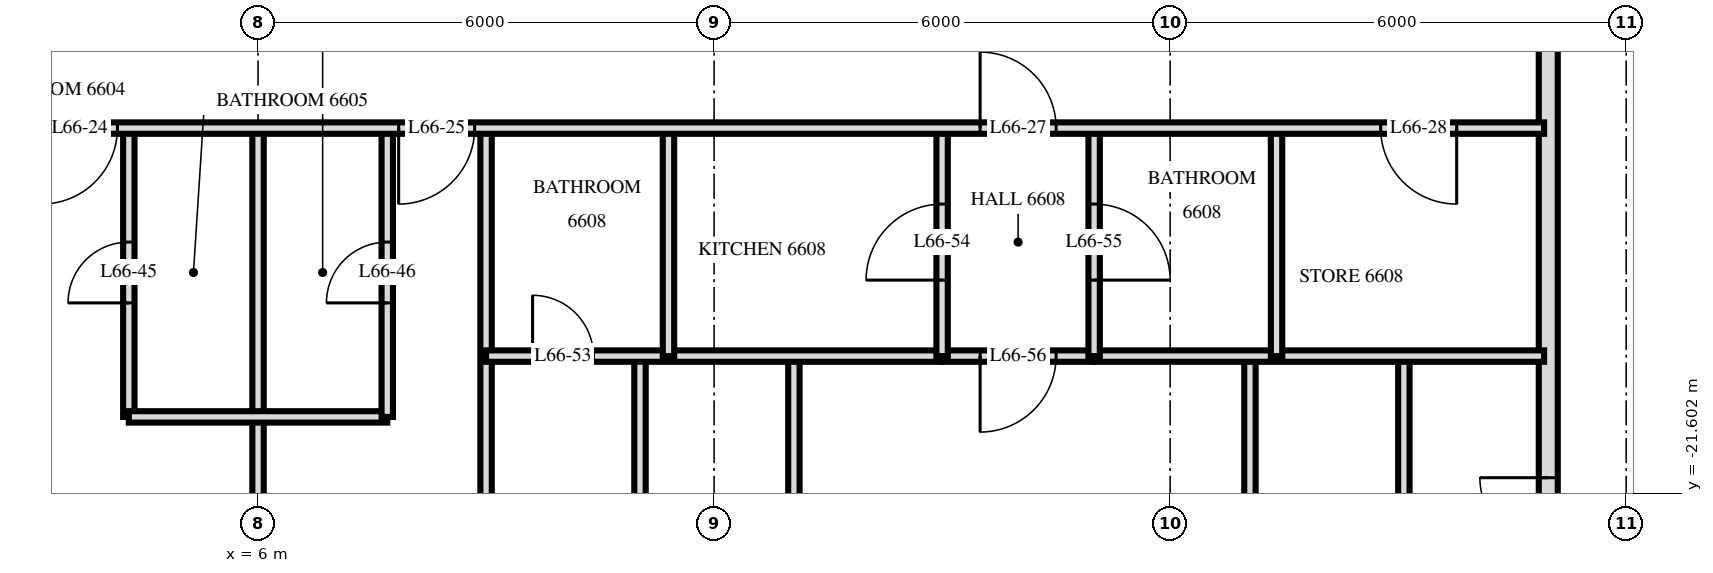
"""IFC4 building model, lengths in metres.
Left out: names, types, materials, properties, quantities, classifications, styles, units other than length and angle.
Written with IfcOpenShell. Run it as: python <this file> out.ifc"""

import sys

from ifc_helpers import new_model, si_unit, direction, frame, frame_2d, origin, place, context, subcontext, project, spatial, rectangle, extrude, element, fill, save


model = new_model("IFC4")
c1 = context("Model", 3, precision=1e-05, world=origin(), true_north=direction((0.0, 1.0)))
c2 = subcontext(c1, "Body", "Model", "MODEL_VIEW")
j1 = project(units=[si_unit("LENGTHUNIT", "METRE"), si_unit("PLANEANGLEUNIT", "RADIAN")], contexts=[c1])
p1 = place(None, origin())
s1 = spatial("IfcSite", under=j1, at=p1, CompositionType="ELEMENT")
p2 = place(p1, origin())
s2 = spatial("IfcBuilding", under=s1, at=p2, CompositionType="ELEMENT")
p3 = place(p2, frame((0.0, 0.0, 252.6)))
s3 = spatial("IfcBuildingStorey", under=s2, at=p3, CompositionType="ELEMENT", Elevation=252.6)
p4 = place(p3, frame((22.975, -29.275, 0.0), z_axis=(0.0, 0.0, 1.0), x_axis=(0.0, 1.0, 0.0)))
e1 = element("IfcWall", 1, at=p4, inside=s3, PredefinedType="SOLIDWALL", context=c2, shape_type="SweptSolid", body=[
    extrude(rectangle(XDim=25.951, YDim=0.25, at=frame_2d((12.975, 0.0))), origin(), (0.0, 0.0, 1.0), 3.22),
])
p5 = place(p4, frame((0.575, 0.0, 0.0)))
e2 = element("IfcOpeningElement", 2, at=p5, cuts=e1, PredefinedType="OPENING", context=c2, shape_type="SweptSolid", body=[
    extrude(rectangle(XDim=1.8, YDim=2.4, at=frame_2d((0.9, 1.2))), frame((0.0, 0.135, 0.0), z_axis=(0.0, -1.0, 0.0), x_axis=(1.0, 0.0, 0.0)), (0.0, 0.0, 1.0), 0.27),
])
p6 = place(p4, frame((3.325, 0.0, 0.9)))
e3 = element("IfcOpeningElement", 3, at=p6, cuts=e1, PredefinedType="OPENING", context=c2, shape_type="SweptSolid", body=[
    extrude(rectangle(XDim=1.8, YDim=1.5, at=frame_2d((0.9, 0.75))), frame((0.0, 0.135, 0.0), z_axis=(0.0, -1.0, 0.0), x_axis=(1.0, 0.0, 0.0)), (0.0, 0.0, 1.0), 0.27),
])
p7 = place(p4, frame((6.075, 0.0, 0.0)))
e4 = element("IfcOpeningElement", 4, at=p7, cuts=e1, PredefinedType="OPENING", context=c2, shape_type="SweptSolid", body=[
    extrude(rectangle(XDim=1.8, YDim=2.4, at=frame_2d((0.9, 1.2))), frame((0.0, 0.135, 0.0), z_axis=(0.0, -1.0, 0.0), x_axis=(1.0, 0.0, 0.0)), (0.0, 0.0, 1.0), 0.27),
])
p8 = place(p4, frame((14.875, 0.0, 0.0)))
e5 = element("IfcOpeningElement", 5, at=p8, cuts=e1, PredefinedType="OPENING", context=c2, shape_type="SweptSolid", body=[
    extrude(rectangle(XDim=1.8, YDim=2.4, at=frame_2d((0.9, 1.2))), frame((0.0, 0.135, 0.0), z_axis=(0.0, -1.0, 0.0), x_axis=(1.0, 0.0, 0.0)), (0.0, 0.0, 1.0), 0.27),
])
p9 = place(p4, frame((17.575, 0.0, 0.9)))
e6 = element("IfcOpeningElement", 6, at=p9, cuts=e1, PredefinedType="OPENING", context=c2, shape_type="SweptSolid", body=[
    extrude(rectangle(XDim=2.4, YDim=1.5, at=frame_2d((1.2, 0.75))), frame((0.0, 0.135, 0.0), z_axis=(0.0, -1.0, 0.0), x_axis=(1.0, 0.0, 0.0)), (0.0, 0.0, 1.0), 0.27),
])
p10 = place(p4, frame((22.925, 0.0, 0.0)))
e7 = element("IfcOpeningElement", 7, at=p10, cuts=e1, PredefinedType="OPENING", context=c2, shape_type="SweptSolid", body=[
    extrude(rectangle(XDim=1.8, YDim=2.4, at=frame_2d((0.9, 1.2))), frame((0.0, 0.135, 0.0), z_axis=(0.0, -1.0, 0.0), x_axis=(1.0, 0.0, 0.0)), (0.0, 0.0, 1.0), 0.27),
])
p11 = place(p3, frame((21.075, -32.666, 0.0), z_axis=(0.0, 0.0, 1.0), x_axis=(0.0, 1.0, 0.0)))
e8 = element("IfcWall", 8, at=p11, inside=s3, PredefinedType="PARTITIONING", context=c2, shape_type="SweptSolid", body=[
    extrude(rectangle(XDim=12.866, YDim=0.15, at=frame_2d((6.433, 0.0))), origin(), (0.0, 0.0, 1.0), 3.22),
])
p12 = place(p11, frame((5.846, 0.0, 0.0)))
e9 = element("IfcOpeningElement", 9, at=p12, cuts=e8, PredefinedType="OPENING", context=c2, shape_type="SweptSolid", body=[
    extrude(rectangle(XDim=0.9, YDim=2.1, at=frame_2d((0.45, 1.05))), frame((0.0, 0.085, 0.0), z_axis=(0.0, -1.0, 0.0), x_axis=(1.0, 0.0, 0.0)), (0.0, 0.0, 1.0), 0.17),
])
p13 = place(p3, frame((19.4, -19.8, 0.0), z_axis=(0.0, 0.0, 1.0), x_axis=(0.0, 1.0, 0.0)))
e10 = element("IfcWall", 10, at=p13, inside=s3, PredefinedType="PARTITIONING", context=c2, shape_type="SweptSolid", body=[
    extrude(rectangle(XDim=3.0, YDim=0.15, at=frame_2d((1.5, 0.0))), origin(), (0.0, 0.0, 1.0), 3.22),
])
p14 = place(p3, frame((19.05, -33.527, 0.0), z_axis=(0.0, 0.0, 1.0), x_axis=(0.0, 1.0, 0.0)))
e11 = element("IfcWall", 11, at=p14, inside=s3, PredefinedType="PARTITIONING", context=c2, shape_type="SweptSolid", body=[
    extrude(rectangle(XDim=13.727, YDim=0.15, at=frame_2d((6.864, 0.0))), origin(), (0.0, 0.0, 1.0), 3.22),
])
p15 = place(p14, frame((6.307, 0.0, 0.0)))
e12 = element("IfcOpeningElement", 12, at=p15, cuts=e11, PredefinedType="OPENING", context=c2, shape_type="SweptSolid", body=[
    extrude(rectangle(XDim=0.9, YDim=2.1, at=frame_2d((0.45, 1.05))), frame((0.0, 0.085, 0.0), z_axis=(0.0, -1.0, 0.0), x_axis=(1.0, 0.0, 0.0)), (0.0, 0.0, 1.0), 0.17),
])
p16 = place(p3, frame((17.0, -19.8, 0.0), z_axis=(0.0, 0.0, 1.0), x_axis=(0.0, 1.0, 0.0)))
e13 = element("IfcWall", 13, at=p16, inside=s3, PredefinedType="PARTITIONING", context=c2, shape_type="SweptSolid", body=[
    extrude(rectangle(XDim=3.0, YDim=0.15, at=frame_2d((1.5, 0.0))), origin(), (0.0, 0.0, 1.0), 3.22),
])
p17 = place(p16, frame((1.0, 0.0, 0.0)))
e14 = element("IfcOpeningElement", 14, at=p17, cuts=e13, PredefinedType="OPENING", context=c2, shape_type="SweptSolid", body=[
    extrude(rectangle(XDim=1.0, YDim=2.1, at=frame_2d((0.5, 1.05))), frame((0.0, 0.085, 0.0), z_axis=(0.0, -1.0, 0.0), x_axis=(1.0, 0.0, 0.0)), (0.0, 0.0, 1.0), 0.17),
])
p18 = place(p3, frame((15.0, -19.8, 0.0), z_axis=(0.0, 0.0, 1.0), x_axis=(0.0, 1.0, 0.0)))
e15 = element("IfcWall", 15, at=p18, inside=s3, PredefinedType="PARTITIONING", context=c2, shape_type="SweptSolid", body=[
    extrude(rectangle(XDim=3.0, YDim=0.15, at=frame_2d((1.5, 0.0))), origin(), (0.0, 0.0, 1.0), 3.22),
])
p19 = place(p18, frame((1.0, 0.0, 0.0)))
e16 = element("IfcOpeningElement", 16, at=p19, cuts=e15, PredefinedType="OPENING", context=c2, shape_type="SweptSolid", body=[
    extrude(rectangle(XDim=1.0, YDim=2.1, at=frame_2d((0.5, 1.05))), frame((0.0, 0.085, 0.0), z_axis=(0.0, -1.0, 0.0), x_axis=(1.0, 0.0, 0.0)), (0.0, 0.0, 1.0), 0.17),
])
p20 = place(p3, frame((13.05, -33.62, 0.0), z_axis=(0.0, 0.0, 1.0), x_axis=(0.0, 1.0, 0.0)))
e17 = element("IfcWall", 17, at=p20, inside=s3, PredefinedType="PARTITIONING", context=c2, shape_type="SweptSolid", body=[
    extrude(rectangle(XDim=13.82, YDim=0.15, at=frame_2d((6.91, 0.0))), origin(), (0.0, 0.0, 1.0), 3.22),
])
p21 = place(p20, frame((6.39, 0.0, 0.0)))
e18 = element("IfcOpeningElement", 18, at=p21, cuts=e17, PredefinedType="OPENING", context=c2, shape_type="SweptSolid", body=[
    extrude(rectangle(XDim=0.9, YDim=2.1, at=frame_2d((0.45, 1.05))), frame((0.0, 0.085, 0.0), z_axis=(0.0, -1.0, 0.0), x_axis=(1.0, 0.0, 0.0)), (0.0, 0.0, 1.0), 0.17),
])
p22 = place(p3, frame((11.4, -19.8, 0.0), z_axis=(0.0, 0.0, 1.0), x_axis=(0.0, 1.0, 0.0)))
e19 = element("IfcWall", 19, at=p22, inside=s3, PredefinedType="PARTITIONING", context=c2, shape_type="SweptSolid", body=[
    extrude(rectangle(XDim=3.0, YDim=0.15, at=frame_2d((1.5, 0.0))), origin(), (0.0, 0.0, 1.0), 3.22),
])
p23 = place(p3, frame((11.025, -33.62, 0.0), z_axis=(0.0, 0.0, 1.0), x_axis=(0.0, 1.0, 0.0)))
e20 = element("IfcWall", 20, at=p23, inside=s3, PredefinedType="PARTITIONING", context=c2, shape_type="SweptSolid", body=[
    extrude(rectangle(XDim=13.82, YDim=0.15, at=frame_2d((6.91, 0.0))), origin(), (0.0, 0.0, 1.0), 3.22),
])
p24 = place(p23, frame((6.39, 0.0, 0.0)))
e21 = element("IfcOpeningElement", 21, at=p24, cuts=e20, PredefinedType="OPENING", context=c2, shape_type="SweptSolid", body=[
    extrude(rectangle(XDim=0.9, YDim=2.1, at=frame_2d((0.45, 1.05))), frame((0.0, 0.085, 0.0), z_axis=(0.0, -1.0, 0.0), x_axis=(1.0, 0.0, 0.0)), (0.0, 0.0, 1.0), 0.17),
])
p25 = place(p3, frame((9.0, -33.62, 0.0), z_axis=(0.0, 0.0, 1.0), x_axis=(0.0, 1.0, 0.0)))
e22 = element("IfcWall", 22, at=p25, inside=s3, PredefinedType="PARTITIONING", context=c2, shape_type="SweptSolid", body=[
    extrude(rectangle(XDim=16.82, YDim=0.15, at=frame_2d((8.41, 0.0))), origin(), (0.0, 0.0, 1.0), 3.22),
])
p26 = place(p3, frame((7.7, -20.6, 0.0), z_axis=(0.0, 0.0, 1.0), x_axis=(0.0, 1.0, 0.0)))
e23 = element("IfcWall", 23, at=p26, inside=s3, PredefinedType="PARTITIONING", context=c2, shape_type="SweptSolid", body=[
    extrude(rectangle(XDim=3.8, YDim=0.15, at=frame_2d((1.9, 0.0))), origin(), (0.0, 0.0, 1.0), 3.22),
])
p27 = place(p26, frame((1.5, 0.0, 0.0)))
e24 = element("IfcOpeningElement", 24, at=p27, cuts=e23, PredefinedType="OPENING", context=c2, shape_type="SweptSolid", body=[
    extrude(rectangle(XDim=0.8, YDim=2.1, at=frame_2d((0.4, 1.05))), frame((0.0, 0.085, 0.0), z_axis=(0.0, -1.0, 0.0), x_axis=(1.0, 0.0, 0.0)), (0.0, 0.0, 1.0), 0.17),
])
p28 = place(p3, frame((6.0, -33.62, 0.0), z_axis=(0.0, 0.0, 1.0), x_axis=(0.0, 1.0, 0.0)))
e25 = element("IfcWall", 25, at=p28, inside=s3, PredefinedType="PARTITIONING", context=c2, shape_type="SweptSolid", body=[
    extrude(rectangle(XDim=16.82, YDim=0.15, at=frame_2d((8.41, 0.0))), origin(), (0.0, 0.0, 1.0), 3.22),
])
p29 = place(p3, frame((4.3, -20.6, 0.0), z_axis=(0.0, 0.0, 1.0), x_axis=(0.0, 1.0, 0.0)))
e26 = element("IfcWall", 26, at=p29, inside=s3, PredefinedType="PARTITIONING", context=c2, shape_type="SweptSolid", body=[
    extrude(rectangle(XDim=3.8, YDim=0.15, at=frame_2d((1.9, 0.0))), origin(), (0.0, 0.0, 1.0), 3.22),
])
p30 = place(p29, frame((1.5, 0.0, 0.0)))
e27 = element("IfcOpeningElement", 27, at=p30, cuts=e26, PredefinedType="OPENING", context=c2, shape_type="SweptSolid", body=[
    extrude(rectangle(XDim=0.8, YDim=2.1, at=frame_2d((0.4, 1.05))), frame((0.0, 0.085, 0.0), z_axis=(0.0, -1.0, 0.0), x_axis=(1.0, 0.0, 0.0)), (0.0, 0.0, 1.0), 0.17),
])
p31 = place(p3, frame((4.3, -20.6, 0.0), z_axis=(0.0, 0.0, 1.0), x_axis=(1.0, 0.0, 0.0)))
e28 = element("IfcWall", 28, at=p31, inside=s3, PredefinedType="PARTITIONING", context=c2, shape_type="SweptSolid", body=[
    extrude(rectangle(XDim=3.4, YDim=0.15, at=frame_2d((1.7, 0.0))), origin(), (0.0, 0.0, 1.0), 3.22),
])
p32 = place(p3, frame((15.0, -19.8, 0.0), z_axis=(0.0, 0.0, 1.0), x_axis=(1.0, 0.0, 0.0)))
e29 = element("IfcWall", 29, at=p32, inside=s3, PredefinedType="PARTITIONING", context=c2, shape_type="SweptSolid", body=[
    extrude(rectangle(XDim=2.0, YDim=0.15, at=frame_2d((1.0, 0.0))), origin(), (0.0, 0.0, 1.0), 3.22),
])
p33 = place(p32, frame((0.5, 0.0, 0.0)))
e30 = element("IfcOpeningElement", 30, at=p33, cuts=e29, PredefinedType="OPENING", context=c2, shape_type="SweptSolid", body=[
    extrude(rectangle(XDim=1.0, YDim=2.1, at=frame_2d((0.5, 1.05))), frame((0.0, 0.085, 0.0), z_axis=(0.0, -1.0, 0.0), x_axis=(1.0, 0.0, 0.0)), (0.0, 0.0, 1.0), 0.17),
])
p34 = place(p3, frame((9.0, -19.8, 0.0), z_axis=(0.0, 0.0, 1.0), x_axis=(1.0, 0.0, 0.0)))
e31 = element("IfcWall", 31, at=p34, inside=s3, PredefinedType="PARTITIONING", context=c2, shape_type="SweptSolid", body=[
    extrude(rectangle(XDim=6.0, YDim=0.15, at=frame_2d((3.0, 0.0))), origin(), (0.0, 0.0, 1.0), 3.22),
])
p35 = place(p34, frame((0.612, 0.0, 0.0)))
e32 = element("IfcOpeningElement", 32, at=p35, cuts=e31, PredefinedType="OPENING", context=c2, shape_type="SweptSolid", body=[
    extrude(rectangle(XDim=0.8, YDim=2.1, at=frame_2d((0.4, 1.05))), frame((0.0, 0.085, 0.0), z_axis=(0.0, -1.0, 0.0), x_axis=(1.0, 0.0, 0.0)), (0.0, 0.0, 1.0), 0.17),
])
p36 = place(p3, frame((17.0, -19.8, 0.0), z_axis=(0.0, 0.0, 1.0), x_axis=(1.0, 0.0, 0.0)))
e33 = element("IfcWall", 33, at=p36, inside=s3, PredefinedType="PARTITIONING", context=c2, shape_type="SweptSolid", body=[
    extrude(rectangle(XDim=5.92, YDim=0.15, at=frame_2d((2.96, 0.0))), origin(), (0.0, 0.0, 1.0), 3.22),
])
p37 = place(p3, frame((-22.92, -16.8, 0.0), z_axis=(0.0, 0.0, 1.0), x_axis=(1.0, 0.0, 0.0)))
e34 = element("IfcWall", 34, at=p37, inside=s3, PredefinedType="PARTITIONING", context=c2, shape_type="SweptSolid", body=[
    extrude(rectangle(XDim=45.84, YDim=0.15, at=frame_2d((22.92, 0.0))), origin(), (0.0, 0.0, 1.0), 3.22),
])
p38 = place(p37, frame((15.67, 0.0, 0.0)))
e35 = element("IfcOpeningElement", 35, at=p38, cuts=e34, PredefinedType="OPENING", context=c2, shape_type="SweptSolid", body=[
    extrude(rectangle(XDim=1.0, YDim=2.1, at=frame_2d((0.5, 1.05))), frame((0.0, 0.085, 0.0), z_axis=(0.0, -1.0, 0.0), x_axis=(1.0, 0.0, 0.0)), (0.0, 0.0, 1.0), 0.17),
])
p39 = place(p37, frame((18.77, 0.0, 0.0)))
e36 = element("IfcOpeningElement", 36, at=p39, cuts=e34, PredefinedType="OPENING", context=c2, shape_type="SweptSolid", body=[
    extrude(rectangle(XDim=1.0, YDim=2.1, at=frame_2d((0.5, 1.05))), frame((0.0, 0.085, 0.0), z_axis=(0.0, -1.0, 0.0), x_axis=(1.0, 0.0, 0.0)), (0.0, 0.0, 1.0), 0.17),
])
p40 = place(p37, frame((20.07, 0.0, 0.0)))
e37 = element("IfcOpeningElement", 37, at=p40, cuts=e34, PredefinedType="OPENING", context=c2, shape_type="SweptSolid", body=[
    extrude(rectangle(XDim=1.0, YDim=2.1, at=frame_2d((0.5, 1.05))), frame((0.0, 0.085, 0.0), z_axis=(0.0, -1.0, 0.0), x_axis=(1.0, 0.0, 0.0)), (0.0, 0.0, 1.0), 0.17),
])
p41 = place(p37, frame((24.77, 0.0, 0.0)))
e38 = element("IfcOpeningElement", 38, at=p41, cuts=e34, PredefinedType="OPENING", context=c2, shape_type="SweptSolid", body=[
    extrude(rectangle(XDim=1.0, YDim=2.1, at=frame_2d((0.5, 1.05))), frame((0.0, 0.085, 0.0), z_axis=(0.0, -1.0, 0.0), x_axis=(1.0, 0.0, 0.0)), (0.0, 0.0, 1.0), 0.17),
])
p42 = place(p37, frame((26.07, 0.0, 0.0)))
e39 = element("IfcOpeningElement", 39, at=p42, cuts=e34, PredefinedType="OPENING", context=c2, shape_type="SweptSolid", body=[
    extrude(rectangle(XDim=1.0, YDim=2.1, at=frame_2d((0.5, 1.05))), frame((0.0, 0.085, 0.0), z_axis=(0.0, -1.0, 0.0), x_axis=(1.0, 0.0, 0.0)), (0.0, 0.0, 1.0), 0.17),
])
p43 = place(p37, frame((30.77, 0.0, 0.0)))
e40 = element("IfcOpeningElement", 40, at=p43, cuts=e34, PredefinedType="OPENING", context=c2, shape_type="SweptSolid", body=[
    extrude(rectangle(XDim=1.0, YDim=2.1, at=frame_2d((0.5, 1.05))), frame((0.0, 0.085, 0.0), z_axis=(0.0, -1.0, 0.0), x_axis=(1.0, 0.0, 0.0)), (0.0, 0.0, 1.0), 0.17),
])
p44 = place(p37, frame((7.02, 0.0, 0.0)))
e41 = element("IfcOpeningElement", 41, at=p44, cuts=e34, PredefinedType="OPENING", context=c2, shape_type="SweptSolid", body=[
    extrude(rectangle(XDim=1.0, YDim=2.1, at=frame_2d((0.5, 1.05))), frame((0.0, 0.085, 0.0), z_axis=(0.0, -1.0, 0.0), x_axis=(1.0, 0.0, 0.0)), (0.0, 0.0, 1.0), 0.17),
])
p45 = place(p37, frame((38.42, 0.0, 0.0)))
e42 = element("IfcOpeningElement", 42, at=p45, cuts=e34, PredefinedType="OPENING", context=c2, shape_type="SweptSolid", body=[
    extrude(rectangle(XDim=1.0, YDim=2.1, at=frame_2d((0.5, 1.05))), frame((0.0, 0.085, 0.0), z_axis=(0.0, -1.0, 0.0), x_axis=(1.0, 0.0, 0.0)), (0.0, 0.0, 1.0), 0.17),
])
p46 = place(p37, frame((43.69, 0.0, 0.0)))
e43 = element("IfcOpeningElement", 43, at=p46, cuts=e34, PredefinedType="OPENING", context=c2, shape_type="SweptSolid", body=[
    extrude(rectangle(XDim=1.0, YDim=2.1, at=frame_2d((0.5, 1.05))), frame((0.0, 0.085, 0.0), z_axis=(0.0, -1.0, 0.0), x_axis=(1.0, 0.0, 0.0)), (0.0, 0.0, 1.0), 0.17),
])
p47 = place(p7, origin())
e44 = element("IfcDoor", 44, at=p47, inside=s3, OperationType="DOUBLE_DOOR_SINGLE_SWING", PredefinedType="DOOR", context=c2, shape_type="SweptSolid", body=[
    extrude(rectangle(XDim=1.8, YDim=2.4, at=frame_2d((0.9, 1.2))), frame((0.0, 0.025, 0.0), z_axis=(0.0, -1.0, 0.0), x_axis=(1.0, 0.0, 0.0)), (0.0, 0.0, 1.0), 0.05),
])
fill(e4, e44)
p48 = place(p42, frame((0.5, 0.0, 0.0), z_axis=(0.0, 0.0, 1.0), x_axis=(-1.0, 0.0, 0.0)))
e45 = element("IfcDoor", 45, at=p48, inside=s3, OperationType="SINGLE_SWING_LEFT", PredefinedType="DOOR", context=c2, shape_type="SweptSolid", body=[
    extrude(rectangle(XDim=1.0, YDim=2.1, at=frame_2d((0.0, 1.05))), frame((0.0, -0.025, 0.0), z_axis=(0.0, 1.0, 0.0), x_axis=(-1.0, 0.0, 0.0)), (0.0, 0.0, 1.0), 0.05),
])
fill(e39, e45)
p49 = place(p43, frame((0.5, 0.0, 0.0), z_axis=(0.0, 0.0, 1.0), x_axis=(-1.0, 0.0, 0.0)))
e46 = element("IfcDoor", 46, at=p49, inside=s3, OperationType="SINGLE_SWING_LEFT", PredefinedType="DOOR", context=c2, shape_type="SweptSolid", body=[
    extrude(rectangle(XDim=1.0, YDim=2.1, at=frame_2d((0.0, 1.05))), frame((0.0, -0.025, 0.0), z_axis=(0.0, 1.0, 0.0), x_axis=(-1.0, 0.0, 0.0)), (0.0, 0.0, 1.0), 0.05),
])
fill(e40, e46)
p50 = place(p45, origin())
e47 = element("IfcDoor", 47, at=p50, inside=s3, OperationType="SINGLE_SWING_RIGHT", PredefinedType="DOOR", context=c2, shape_type="SweptSolid", body=[
    extrude(rectangle(XDim=1.0, YDim=2.1, at=frame_2d((0.5, 1.05))), frame((0.0, 0.025, 0.0), z_axis=(0.0, -1.0, 0.0), x_axis=(1.0, 0.0, 0.0)), (0.0, 0.0, 1.0), 0.05),
])
fill(e42, e47)
p51 = place(p46, frame((0.5, 0.0, 0.0), z_axis=(0.0, 0.0, 1.0), x_axis=(-1.0, 0.0, 0.0)))
e48 = element("IfcDoor", 48, at=p51, inside=s3, OperationType="SINGLE_SWING_RIGHT", PredefinedType="DOOR", context=c2, shape_type="SweptSolid", body=[
    extrude(rectangle(XDim=1.0, YDim=2.1, at=frame_2d((0.0, 1.05))), frame((0.0, -0.025, 0.0), z_axis=(0.0, 1.0, 0.0), x_axis=(-1.0, 0.0, 0.0)), (0.0, 0.0, 1.0), 0.05),
])
fill(e43, e48)
p52 = place(p30, origin())
e49 = element("IfcDoor", 49, at=p52, inside=s3, OperationType="SINGLE_SWING_RIGHT", PredefinedType="DOOR", context=c2, shape_type="SweptSolid", body=[
    extrude(rectangle(XDim=0.8, YDim=2.1, at=frame_2d((0.4, 1.05))), frame((0.0, 0.025, 0.0), z_axis=(0.0, -1.0, 0.0), x_axis=(1.0, 0.0, 0.0)), (0.0, 0.0, 1.0), 0.05),
])
fill(e27, e49)
p53 = place(p27, origin())
e50 = element("IfcDoor", 50, at=p53, inside=s3, OperationType="SINGLE_SWING_RIGHT", PredefinedType="DOOR", context=c2, shape_type="SweptSolid", body=[
    extrude(rectangle(XDim=0.8, YDim=2.1, at=frame_2d((0.4, 1.05))), frame((0.0, 0.025, 0.0), z_axis=(0.0, -1.0, 0.0), x_axis=(1.0, 0.0, 0.0)), (0.0, 0.0, 1.0), 0.05),
])
fill(e24, e50)
p54 = place(p35, origin())
e51 = element("IfcDoor", 51, at=p54, inside=s3, OperationType="SINGLE_SWING_RIGHT", PredefinedType="DOOR", context=c2, shape_type="SweptSolid", body=[
    extrude(rectangle(XDim=0.8, YDim=2.1, at=frame_2d((0.4, 1.05))), frame((0.0, 0.025, 0.0), z_axis=(0.0, -1.0, 0.0), x_axis=(1.0, 0.0, 0.0)), (0.0, 0.0, 1.0), 0.05),
])
fill(e32, e51)
p55 = place(p19, origin())
e52 = element("IfcDoor", 52, at=p55, inside=s3, OperationType="SINGLE_SWING_RIGHT", PredefinedType="DOOR", context=c2, shape_type="SweptSolid", body=[
    extrude(rectangle(XDim=1.0, YDim=2.1, at=frame_2d((0.5, 1.05))), frame((0.0, 0.025, 0.0), z_axis=(0.0, -1.0, 0.0), x_axis=(1.0, 0.0, 0.0)), (0.0, 0.0, 1.0), 0.05),
])
fill(e16, e52)
p56 = place(p17, frame((0.5, 0.0, 0.0), z_axis=(0.0, 0.0, 1.0), x_axis=(-1.0, 0.0, 0.0)))
e53 = element("IfcDoor", 53, at=p56, inside=s3, OperationType="SINGLE_SWING_LEFT", PredefinedType="DOOR", context=c2, shape_type="SweptSolid", body=[
    extrude(rectangle(XDim=1.0, YDim=2.1, at=frame_2d((0.0, 1.05))), frame((0.0, -0.025, 0.0), z_axis=(0.0, 1.0, 0.0), x_axis=(-1.0, 0.0, 0.0)), (0.0, 0.0, 1.0), 0.05),
])
fill(e14, e53)
p57 = place(p33, frame((0.5, 0.0, 0.0), z_axis=(0.0, 0.0, 1.0), x_axis=(-1.0, 0.0, 0.0)))
e54 = element("IfcDoor", 54, at=p57, inside=s3, OperationType="SINGLE_SWING_LEFT", PredefinedType="DOOR", context=c2, shape_type="SweptSolid", body=[
    extrude(rectangle(XDim=1.0, YDim=2.1, at=frame_2d((0.0, 1.05))), frame((0.0, -0.025, 0.0), z_axis=(0.0, 1.0, 0.0), x_axis=(-1.0, 0.0, 0.0)), (0.0, 0.0, 1.0), 0.05),
])
fill(e30, e54)
save(model, sys.argv[1])
